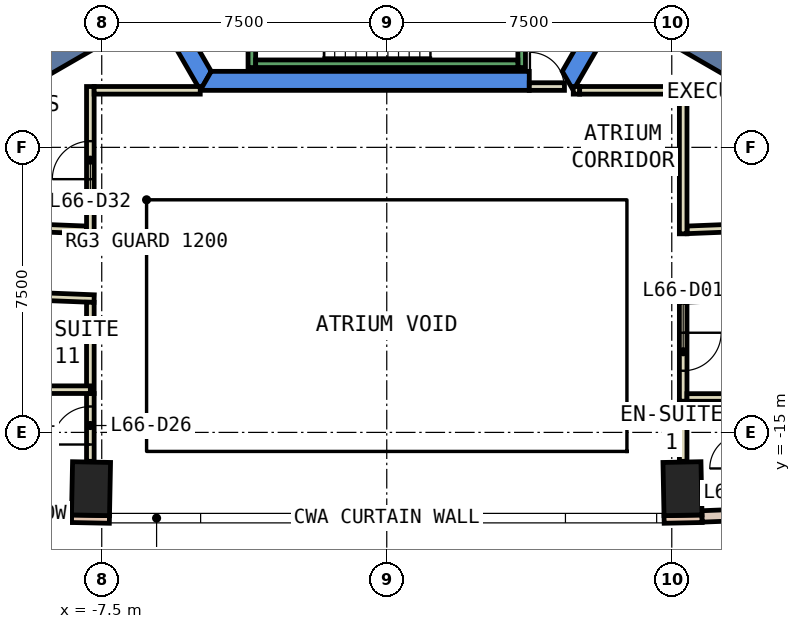
"""IFC4 building model, lengths in metres.
Left out: names, types, materials, properties, quantities, classifications, styles, units other than length and angle.
Written with IfcOpenShell. Run it as: python <this file> out.ifc"""

import sys

from ifc_helpers import new_model, si_unit, direction, frame, frame_2d, origin, origin_2d, place, context, subcontext, project, spatial, polyline, rectangle, outline, extrude, element, fill, save


model = new_model("IFC4")
c1 = context("Model", 3, precision=1e-05, world=origin(), true_north=direction((0.0, 1.0)))
c2 = subcontext(c1, "Body", "Model", "MODEL_VIEW")
j1 = project(units=[si_unit("LENGTHUNIT", "METRE"), si_unit("PLANEANGLEUNIT", "RADIAN")], contexts=[c1])
p1 = place(None, origin())
s1 = spatial("IfcSite", under=j1, at=p1, CompositionType="ELEMENT")
p2 = place(p1, origin())
s2 = spatial("IfcBuilding", under=s1, at=p2, CompositionType="ELEMENT")
p3 = place(p2, frame((0.0, 0.0, 286.4)))
s3 = spatial("IfcBuildingStorey", under=s2, at=p3, CompositionType="ELEMENT", Elevation=286.4)
for number, where, z_axis, x_axis in (
    (1, (-7.782, -16.481, 0.0), (0.0, 0.0, 1.0), (-1.0, 0.02, 0.0)),
    (2, (7.782, -16.481, 0.0), (0.0, 0.0, 1.0), (1.0, 0.02, 0.0)),
):
    element("IfcColumn", number, at=place(p3, frame(where, z_axis=z_axis, x_axis=x_axis)), inside=s3, PredefinedType="COLUMN", context=c2, shape_type="SweptSolid", body=[
        extrude(rectangle(XDim=1.0, YDim=1.4, at=origin_2d()), origin(), (0.0, 0.0, 1.0), 3.26),
    ])
p4 = place(p3, frame((0.0, 0.0, -0.6)))
e3 = element("IfcWall", 3, at=p4, inside=s3, PredefinedType="SHEAR", context=c2, shape_type="SweptSolid", body=[
    extrude(outline(polyline([(-9.815, 2.5), (-4.907, -6.0), (-4.619, -5.5), (-9.238, 2.5), (-9.815, 2.5)])), origin(), (0.0, 0.0, 1.0), 3.86),
])
p5 = place(p3, frame((0.0, 0.0, -0.6)))
e4 = element("IfcWall", 4, at=p5, inside=s3, PredefinedType="SHEAR", context=c2, shape_type="SweptSolid", body=[
    extrude(outline(polyline([(3.75, -6.0), (3.75, -5.5), (-4.619, -5.5), (-4.907, -6.0), (3.75, -6.0)])), origin(), (0.0, 0.0, 1.0), 3.86),
])
p6 = place(p3, frame((0.0, 0.0, -0.6)))
e5 = element("IfcWall", 5, at=p6, inside=s3, PredefinedType="SHEAR", context=c2, shape_type="SweptSolid", body=[
    extrude(outline(polyline([(4.907, -6.0), (9.815, 2.5), (9.238, 2.5), (4.619, -5.5), (4.907, -6.0)])), origin(), (0.0, 0.0, 1.0), 3.86),
])
for number, where, z_axis, x_axis in (
    (6, (6.279, -3.625, -0.6), (0.0, 0.0, 1.0), (0.866, -0.5, 0.0)),
    (7, (-6.279, -3.625, -0.6), (0.0, 0.0, 1.0), (-0.866, -0.5, 0.0)),
):
    element("IfcWall", number, at=place(p3, frame(where, z_axis=z_axis, x_axis=x_axis)), inside=s3, PredefinedType="SHEAR", context=c2, shape_type="SweptSolid", body=[
        extrude(rectangle(XDim=9.0, YDim=0.8, at=frame_2d((4.5, 0.0))), origin(), (0.0, 0.0, 1.0), 3.86),
    ])
for number, where, z_axis, x_axis in (
    (8, (-8.298, -17.271, 0.0), (0.0, 0.0, 1.0), (1.0, -0.02, 0.0)),
    (9, (7.298, -17.291, 0.0), (0.0, 0.0, 1.0), (1.0, 0.02, 0.0)),
):
    element("IfcWall", number, at=place(p3, frame(where, z_axis=z_axis, x_axis=x_axis)), inside=s3, PredefinedType="STANDARD", context=c2, shape_type="SweptSolid", body=[
        extrude(rectangle(XDim=1.0, YDim=0.2, at=frame_2d((0.5, 0.0))), origin(), (0.0, 0.0, 1.0), 3.26),
    ])
p7 = place(p3, frame((-11.92, -17.069, 0.0), z_axis=(0.0, 0.0, 1.0), x_axis=(0.999234893779, -0.039110446866, 0.0)))
e10 = element("IfcWall", 10, at=p7, inside=s3, PredefinedType="STANDARD", context=c2, shape_type="SweptSolid", body=[
    extrude(rectangle(XDim=3.627, YDim=0.3, at=frame_2d((1.813, 0.0))), origin(), (0.0, 0.0, 1.0), 3.26),
])
p8 = place(p7, frame((1.113, 0.0, 0.9)))
e11 = element("IfcOpeningElement", 11, at=p8, cuts=e10, PredefinedType="OPENING", context=c2, shape_type="SweptSolid", body=[
    extrude(rectangle(XDim=1.4, YDim=2.0, at=frame_2d((0.7, 1.0))), frame((0.0, 0.16, 0.0), z_axis=(0.0, -1.0, 0.0), x_axis=(1.0, 0.0, 0.0)), (0.0, 0.0, 1.0), 0.32),
])
p9 = place(p3, frame((8.296, -17.211, 0.0), z_axis=(0.0, 0.0, 1.0), x_axis=(0.999234893779, 0.039110446866, 0.0)))
e12 = element("IfcWall", 12, at=p9, inside=s3, PredefinedType="STANDARD", context=c2, shape_type="SweptSolid", body=[
    extrude(rectangle(XDim=3.627, YDim=0.3, at=frame_2d((1.813, 0.0))), origin(), (0.0, 0.0, 1.0), 3.26),
])
p10 = place(p9, frame((1.113, 0.0, 0.9)))
e13 = element("IfcOpeningElement", 13, at=p10, cuts=e12, PredefinedType="OPENING", context=c2, shape_type="SweptSolid", body=[
    extrude(rectangle(XDim=1.4, YDim=2.0, at=frame_2d((0.7, 1.0))), frame((0.0, 0.16, 0.0), z_axis=(0.0, -1.0, 0.0), x_axis=(1.0, 0.0, 0.0)), (0.0, 0.0, 1.0), 0.32),
])
p11 = place(p3, frame((7.9, -9.671, 0.0), z_axis=(0.0, 0.0, 1.0), x_axis=(0.999223751627, 0.039394088186, 0.0)))
e14 = element("IfcWall", 14, at=p11, inside=s3, PredefinedType="PARTITIONING", context=c2, shape_type="SweptSolid", body=[
    extrude(rectangle(XDim=3.347, YDim=0.2, at=frame_2d((1.673, 0.0))), origin(), (0.0, 0.0, 1.0), 3.26),
])
p12 = place(p3, frame((-10.367, -9.574, 0.0), z_axis=(0.0, 0.0, 1.0), x_axis=(0.999229139158, -0.039257196264, 0.0)))
e15 = element("IfcWall", 15, at=p12, inside=s3, PredefinedType="PARTITIONING", context=c2, shape_type="SweptSolid", body=[
    extrude(rectangle(XDim=2.469, YDim=0.2, at=frame_2d((1.234, 0.0))), origin(), (0.0, 0.0, 1.0), 3.26),
])
p13 = place(p3, frame((11.474, -11.332, 0.0), z_axis=(0.0, 0.0, 1.0), x_axis=(-0.999232546126, -0.039170381199, 0.0)))
e16 = element("IfcWall", 16, at=p13, inside=s3, PredefinedType="PARTITIONING", context=c2, shape_type="SweptSolid", body=[
    extrude(rectangle(XDim=3.777, YDim=0.2, at=frame_2d((1.889, 0.0))), origin(), (0.0, 0.0, 1.0), 3.26),
])
p14 = place(p3, frame((-7.7, -11.48, 0.0), z_axis=(0.0, 0.0, 1.0), x_axis=(-0.999233433291, 0.039147743138, 0.0)))
e17 = element("IfcWall", 17, at=p14, inside=s3, PredefinedType="PARTITIONING", context=c2, shape_type="SweptSolid", body=[
    extrude(rectangle(XDim=2.401, YDim=0.2, at=frame_2d((1.201, 0.0))), origin(), (0.0, 0.0, 1.0), 3.26),
])
p15 = place(p3, frame((4.908, -5.999, 0.0), z_axis=(0.0, 0.0, 1.0), x_axis=(1.0, 0.0, 0.0)))
e18 = element("IfcWall", 18, at=p15, inside=s3, PredefinedType="PARTITIONING", context=c2, shape_type="SweptSolid", body=[
    extrude(rectangle(XDim=0.168, YDim=0.2, at=frame_2d((0.084, 0.0))), origin(), (0.0, 0.0, 1.0), 2.4),
])
p16 = place(p3, frame((7.8, -5.899, 0.0), z_axis=(0.0, 0.0, 1.0), x_axis=(0.0, -1.0, 0.0)))
e19 = element("IfcWall", 19, at=p16, inside=s3, PredefinedType="PARTITIONING", context=c2, shape_type="SweptSolid", body=[
    extrude(rectangle(XDim=3.876, YDim=0.2, at=frame_2d((1.938, 0.0))), origin(), (0.0, 0.0, 1.0), 3.26),
])
p17 = place(p3, frame((-7.8, -9.775, 0.0), z_axis=(0.0, 0.0, 1.0), x_axis=(0.0, 1.0, 0.0)))
e20 = element("IfcWall", 20, at=p17, inside=s3, PredefinedType="PARTITIONING", context=c2, shape_type="SweptSolid", body=[
    extrude(rectangle(XDim=3.876, YDim=0.2, at=frame_2d((1.938, 0.0))), origin(), (0.0, 0.0, 1.0), 3.26),
])
p18 = place(p17, frame((1.438, 0.0, 0.0)))
e21 = element("IfcOpeningElement", 21, at=p18, cuts=e20, PredefinedType="OPENING", context=c2, shape_type="SweptSolid", body=[
    extrude(rectangle(XDim=1.0, YDim=2.1, at=frame_2d((0.5, 1.05))), frame((0.0, 0.11, 0.0), z_axis=(0.0, -1.0, 0.0), x_axis=(1.0, 0.0, 0.0)), (0.0, 0.0, 1.0), 0.22),
])
p19 = place(p3, frame((-7.7, -5.999, 0.0), z_axis=(0.0, 0.0, 1.0), x_axis=(1.0, 0.0, 0.0)))
e22 = element("IfcWall", 22, at=p19, inside=s3, PredefinedType="PARTITIONING", context=c2, shape_type="SweptSolid", body=[
    extrude(rectangle(XDim=2.792, YDim=0.2, at=frame_2d((1.396, 0.0))), origin(), (0.0, 0.0, 1.0), 3.26),
])
p20 = place(p3, frame((7.8, -11.576, 0.0), z_axis=(0.0, 0.0, 1.0), x_axis=(0.0, -1.0, 0.0)))
e23 = element("IfcWall", 23, at=p20, inside=s3, PredefinedType="PARTITIONING", context=c2, shape_type="SweptSolid", body=[
    extrude(rectangle(XDim=2.605, YDim=0.2, at=frame_2d((1.302, 0.0))), origin(), (0.0, 0.0, 1.0), 3.26),
])
p21 = place(p20, frame((0.802, 0.0, 0.0)))
e24 = element("IfcOpeningElement", 24, at=p21, cuts=e23, PredefinedType="OPENING", context=c2, shape_type="SweptSolid", body=[
    extrude(rectangle(XDim=1.0, YDim=2.1, at=frame_2d((0.5, 1.05))), frame((0.0, 0.11, 0.0), z_axis=(0.0, -1.0, 0.0), x_axis=(1.0, 0.0, 0.0)), (0.0, 0.0, 1.0), 0.22),
])
p22 = place(p3, frame((7.8, -14.181, 0.0), z_axis=(0.0, 0.0, 1.0), x_axis=(0.0, -1.0, 0.0)))
e25 = element("IfcWall", 25, at=p22, inside=s3, PredefinedType="PARTITIONING", context=c2, shape_type="SweptSolid", body=[
    extrude(rectangle(XDim=1.58, YDim=0.2, at=frame_2d((0.79, 0.0))), origin(), (0.0, 0.0, 1.0), 3.26),
])
p23 = place(p3, frame((-7.8, -15.761, 0.0), z_axis=(0.0, 0.0, 1.0), x_axis=(0.0, 1.0, 0.0)))
e26 = element("IfcWall", 26, at=p23, inside=s3, PredefinedType="PARTITIONING", context=c2, shape_type="SweptSolid", body=[
    extrude(rectangle(XDim=1.785, YDim=0.2, at=frame_2d((0.893, 0.0))), origin(), (0.0, 0.0, 1.0), 3.26),
])
p24 = place(p23, frame((0.442, 0.0, 0.0)))
e27 = element("IfcOpeningElement", 27, at=p24, cuts=e26, PredefinedType="OPENING", context=c2, shape_type="SweptSolid", body=[
    extrude(rectangle(XDim=1.0, YDim=2.1, at=frame_2d((0.5, 1.05))), frame((0.0, 0.11, 0.0), z_axis=(0.0, -1.0, 0.0), x_axis=(1.0, 0.0, 0.0)), (0.0, 0.0, 1.0), 0.22),
])
p25 = place(p3, frame((-7.8, -13.976, 0.0), z_axis=(0.0, 0.0, 1.0), x_axis=(0.0, 1.0, 0.0)))
e28 = element("IfcWall", 28, at=p25, inside=s3, PredefinedType="PARTITIONING", context=c2, shape_type="SweptSolid", body=[
    extrude(rectangle(XDim=2.4, YDim=0.2, at=frame_2d((1.2, 0.0))), origin(), (0.0, 0.0, 1.0), 3.26),
])
p26 = place(p3, frame((-6.845, -2.643, 0.0), z_axis=(0.0, 0.0, 1.0), x_axis=(-0.865994457699, -0.500053596362, 0.0)))
e29 = element("IfcWall", 29, at=p26, inside=s3, PredefinedType="PARTITIONING", context=c2, shape_type="SweptSolid", body=[
    extrude(rectangle(XDim=6.701, YDim=0.2, at=frame_2d((3.351, 0.0))), origin(), (0.0, 0.0, 1.0), 3.26),
])
p27 = place(p3, frame((9.3, -14.081, 0.0), z_axis=(0.0, 0.0, 1.0), x_axis=(-1.0, 0.0, 0.0)))
e30 = element("IfcWall", 30, at=p27, inside=s3, PredefinedType="PARTITIONING", context=c2, shape_type="SweptSolid", body=[
    extrude(rectangle(XDim=1.4, YDim=0.2, at=frame_2d((0.7, 0.0))), origin(), (0.0, 0.0, 1.0), 3.26),
])
p28 = place(p3, frame((-10.1, -13.876, 0.0), z_axis=(0.0, 0.0, 1.0), x_axis=(1.0, 0.0, 0.0)))
e31 = element("IfcWall", 31, at=p28, inside=s3, PredefinedType="PARTITIONING", context=c2, shape_type="SweptSolid", body=[
    extrude(rectangle(XDim=2.3, YDim=0.2, at=frame_2d((1.15, 0.0))), origin(), (0.0, 0.0, 1.0), 3.26),
])
p29 = place(p3, frame((3.75, -5.9, 0.0), z_axis=(0.0, 0.0, 1.0), x_axis=(1.0, 0.0, 0.0)))
e32 = element("IfcWall", 32, at=p29, inside=s3, PredefinedType="PARTITIONING", context=c2, shape_type="SweptSolid", body=[
    extrude(rectangle(XDim=0.926, YDim=0.2, at=frame_2d((0.463, 0.0))), origin(), (0.0, 0.0, 1.0), 2.4),
])
p30 = place(p29, frame((0.017, 0.0, 0.0)))
e33 = element("IfcOpeningElement", 33, at=p30, cuts=e32, PredefinedType="OPENING", context=c2, shape_type="SweptSolid", body=[
    extrude(rectangle(XDim=0.9, YDim=2.1, at=frame_2d((0.45, 1.05))), frame((0.0, 0.11, 0.0), z_axis=(0.0, -1.0, 0.0), x_axis=(1.0, 0.0, 0.0)), (0.0, 0.0, 1.0), 0.22),
])
p31 = place(p3, frame((5.076, -5.999, 0.0), z_axis=(0.0, 0.0, 1.0), x_axis=(1.0, 0.0, 0.0)))
e34 = element("IfcWall", 34, at=p31, inside=s3, PredefinedType="PARTITIONING", context=c2, shape_type="SweptSolid", body=[
    extrude(rectangle(XDim=2.624, YDim=0.2, at=frame_2d((1.312, 0.0))), origin(), (0.0, 0.0, 1.0), 3.26),
])
p32 = place(p3, frame((-3.55, -1.0, 0.0), z_axis=(0.0, 0.0, 1.0), x_axis=(0.0, -1.0, 0.0)))
e35 = element("IfcWall", 35, at=p32, inside=s3, PredefinedType="STANDARD", context=c2, shape_type="SweptSolid", body=[
    extrude(rectangle(XDim=4.4, YDim=0.2, at=frame_2d((2.2, 0.0))), origin(), (0.0, 0.0, 1.0), 3.26),
])
p33 = place(p32, frame((2.4, 0.0, 0.0)))
e36 = element("IfcOpeningElement", 36, at=p33, cuts=e35, PredefinedType="OPENING", context=c2, shape_type="SweptSolid", body=[
    extrude(rectangle(XDim=1.1, YDim=2.2, at=frame_2d((0.55, 1.1))), frame((0.0, 0.11, 0.0), z_axis=(0.0, -1.0, 0.0), x_axis=(1.0, 0.0, 0.0)), (0.0, 0.0, 1.0), 0.22),
])
p34 = place(p3, frame((3.55, -2.667, 0.0), z_axis=(0.0, 0.0, 1.0), x_axis=(0.0, -1.0, 0.0)))
e37 = element("IfcWall", 37, at=p34, inside=s3, PredefinedType="STANDARD", context=c2, shape_type="SweptSolid", body=[
    extrude(rectangle(XDim=2.733, YDim=0.2, at=frame_2d((1.366, 0.0))), origin(), (0.0, 0.0, 1.0), 3.26),
])
p35 = place(p3, frame((-3.45, -5.3, 0.0), z_axis=(0.0, 0.0, 1.0), x_axis=(1.0, 0.0, 0.0)))
e38 = element("IfcWall", 38, at=p35, inside=s3, PredefinedType="STANDARD", context=c2, shape_type="SweptSolid", body=[
    extrude(rectangle(XDim=6.9, YDim=0.2, at=frame_2d((3.45, 0.0))), origin(), (0.0, 0.0, 1.0), 3.26),
])
p36 = place(p21, origin())
e39 = element("IfcDoor", 39, at=p36, inside=s3, OperationType="SINGLE_SWING_LEFT", PredefinedType="DOOR", context=c2, shape_type="SweptSolid", body=[
    extrude(rectangle(XDim=1.0, YDim=2.1, at=frame_2d((0.5, 1.05))), frame((0.0, 0.025, 0.0), z_axis=(0.0, -1.0, 0.0), x_axis=(1.0, 0.0, 0.0)), (0.0, 0.0, 1.0), 0.05),
])
fill(e24, e39)
p37 = place(p24, origin())
e40 = element("IfcDoor", 40, at=p37, inside=s3, OperationType="SINGLE_SWING_RIGHT", PredefinedType="DOOR", context=c2, shape_type="SweptSolid", body=[
    extrude(rectangle(XDim=1.0, YDim=2.1, at=frame_2d((0.5, 1.05))), frame((0.0, 0.025, 0.0), z_axis=(0.0, -1.0, 0.0), x_axis=(1.0, 0.0, 0.0)), (0.0, 0.0, 1.0), 0.05),
])
fill(e27, e40)
p38 = place(p18, origin())
e41 = element("IfcDoor", 41, at=p38, inside=s3, OperationType="SINGLE_SWING_LEFT", PredefinedType="DOOR", context=c2, shape_type="SweptSolid", body=[
    extrude(rectangle(XDim=1.0, YDim=2.1, at=frame_2d((0.5, 1.05))), frame((0.0, 0.025, 0.0), z_axis=(0.0, -1.0, 0.0), x_axis=(1.0, 0.0, 0.0)), (0.0, 0.0, 1.0), 0.05),
])
fill(e21, e41)
p39 = place(p30, origin())
e42 = element("IfcDoor", 42, at=p39, inside=s3, OperationType="SINGLE_SWING_LEFT", PredefinedType="DOOR", context=c2, shape_type="SweptSolid", body=[
    extrude(rectangle(XDim=0.9, YDim=2.1, at=frame_2d((0.45, 1.05))), frame((0.0, 0.025, 0.0), z_axis=(0.0, -1.0, 0.0), x_axis=(1.0, 0.0, 0.0)), (0.0, 0.0, 1.0), 0.05),
])
fill(e33, e42)
save(model, sys.argv[1])
